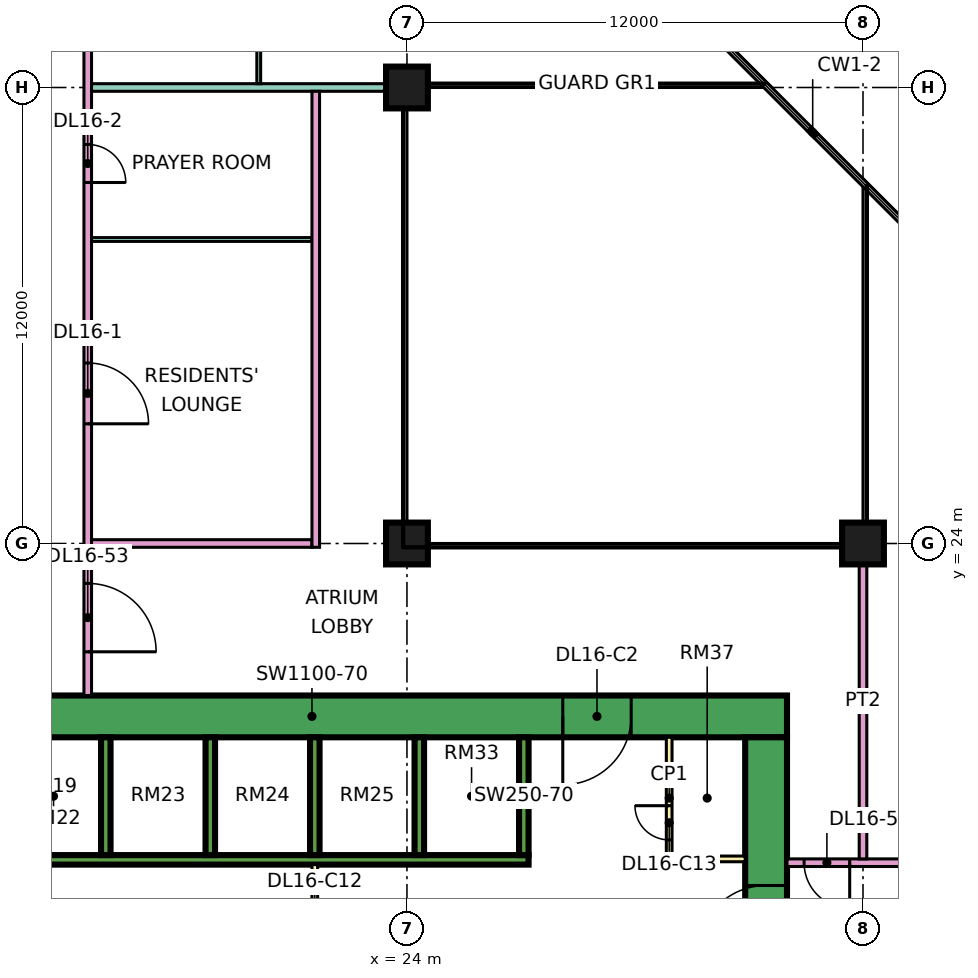
"""IFC4 building model, lengths in metres.
Left out: names, types, materials, properties, quantities, classifications, styles, units other than length and angle.
Written with IfcOpenShell. Run it as: python <this file> out.ifc"""

import sys

from ifc_helpers import new_model, si_unit, direction, frame, frame_2d, origin, origin_2d, place, context, subcontext, project, spatial, rectangle, extrude, element, fill, save


model = new_model("IFC4")
c1 = context("Model", 3, precision=1e-05, world=origin(), true_north=direction((0.0, 1.0)))
c2 = subcontext(c1, "Body", "Model", "MODEL_VIEW")
j1 = project(units=[si_unit("LENGTHUNIT", "METRE"), si_unit("PLANEANGLEUNIT", "RADIAN")], contexts=[c1])
p1 = place(None, origin())
s1 = spatial("IfcSite", under=j1, at=p1, CompositionType="ELEMENT")
p2 = place(p1, origin())
s2 = spatial("IfcBuilding", under=s1, at=p2, CompositionType="ELEMENT")
p3 = place(p2, frame((0.0, 0.0, 75.15)))
s3 = spatial("IfcBuildingStorey", under=s2, at=p3, CompositionType="ELEMENT", Elevation=75.15)
for number, where, z_axis, x_axis in (
    (1, (24.0, 24.0, 0.0), (0.0, 0.0, 1.0), (1.0, 0.0, 0.0)),
    (2, (24.0, 36.0, 0.0), (0.0, 0.0, 1.0), (1.0, 0.0, 0.0)),
    (3, (36.0, 24.0, 0.0), (0.0, 0.0, 1.0), (1.0, 0.0, 0.0)),
):
    element("IfcColumn", number, at=place(p3, frame(where, z_axis=z_axis, x_axis=x_axis)), inside=s3, PredefinedType="COLUMN", context=c2, shape_type="SweptSolid", body=[
        extrude(rectangle(XDim=1.1, YDim=1.1, at=origin_2d()), origin(), (0.0, 0.0, 1.0), 3.75),
    ])
p4 = place(p3, frame((9.0, 19.45, 0.0), z_axis=(0.0, 0.0, 1.0), x_axis=(1.0, 0.0, 0.0)))
e4 = element("IfcWall", 4, at=p4, inside=s3, PredefinedType="SHEAR", context=c2, shape_type="SweptSolid", body=[
    extrude(rectangle(XDim=25.0, YDim=1.1, at=frame_2d((12.5, 0.0))), origin(), (0.0, 0.0, 1.0), 3.75),
])
p5 = place(p4, frame((19.1, 0.0, 0.0)))
e5 = element("IfcOpeningElement", 5, at=p5, cuts=e4, PredefinedType="OPENING", context=c2, shape_type="SweptSolid", body=[
    extrude(rectangle(XDim=1.8, YDim=2.4, at=frame_2d((0.9, 1.2))), frame((0.0, 0.56, 0.0), z_axis=(0.0, -1.0, 0.0), x_axis=(1.0, 0.0, 0.0)), (0.0, 0.0, 1.0), 1.12),
])
p6 = place(p3, frame((33.45, 8.1, 0.0), z_axis=(0.0, 0.0, 1.0), x_axis=(0.0, 1.0, 0.0)))
e6 = element("IfcWall", 6, at=p6, inside=s3, PredefinedType="SHEAR", context=c2, shape_type="SweptSolid", body=[
    extrude(rectangle(XDim=10.8, YDim=1.1, at=frame_2d((5.4, 0.0))), origin(), (0.0, 0.0, 1.0), 3.75),
])
p7 = place(p6, frame((5.1, 0.0, 0.0)))
e7 = element("IfcOpeningElement", 7, at=p7, cuts=e6, PredefinedType="OPENING", context=c2, shape_type="SweptSolid", body=[
    extrude(rectangle(XDim=1.8, YDim=2.4, at=frame_2d((0.9, 1.2))), frame((0.0, 0.56, 0.0), z_axis=(0.0, -1.0, 0.0), x_axis=(1.0, 0.0, 0.0)), (0.0, 0.0, 1.0), 1.12),
])
p8 = place(p3, frame((13.45, 15.675, 0.0), z_axis=(0.0, 0.0, 1.0), x_axis=(1.0, 0.0, 0.0)))
e8 = element("IfcWall", 8, at=p8, inside=s3, PredefinedType="SHEAR", context=c2, shape_type="SweptSolid", body=[
    extrude(rectangle(XDim=13.75, YDim=0.25, at=frame_2d((6.875, 0.0))), origin(), (0.0, 0.0, 1.0), 3.75),
])
for number, where, z_axis, x_axis in (
    (9, (16.075, 15.8, 0.0), (0.0, 0.0, 1.0), (0.0, 1.0, 0.0)),
    (10, (18.825, 15.8, 0.0), (0.0, 0.0, 1.0), (0.0, 1.0, 0.0)),
    (11, (21.575, 15.8, 0.0), (0.0, 0.0, 1.0), (0.0, 1.0, 0.0)),
    (12, (24.325, 15.8, 0.0), (0.0, 0.0, 1.0), (0.0, 1.0, 0.0)),
    (13, (27.075, 15.8, 0.0), (0.0, 0.0, 1.0), (0.0, 1.0, 0.0)),
):
    element("IfcWall", number, at=place(p3, frame(where, z_axis=z_axis, x_axis=x_axis)), inside=s3, PredefinedType="SHEAR", context=c2, shape_type="SweptSolid", body=[
        extrude(rectangle(XDim=3.1, YDim=0.25, at=frame_2d((1.55, 0.0))), origin(), (0.0, 0.0, 1.0), 3.75),
    ])
p9 = place(p3, frame((21.575, 11.45, 0.0), z_axis=(0.0, 0.0, 1.0), x_axis=(0.0, 1.0, 0.0)))
e14 = element("IfcWall", 14, at=p9, inside=s3, PredefinedType="PARTITIONING", context=c2, shape_type="SweptSolid", body=[
    extrude(rectangle(XDim=4.1, YDim=0.15, at=frame_2d((2.05, 0.0))), origin(), (0.0, 0.0, 1.0), 3.35),
])
p10 = place(p9, frame((1.15, 0.0, 0.0)))
e15 = element("IfcOpeningElement", 15, at=p10, cuts=e14, PredefinedType="OPENING", context=c2, shape_type="SweptSolid", body=[
    extrude(rectangle(XDim=1.8, YDim=2.4, at=frame_2d((0.9, 1.2))), frame((0.0, 0.085, 0.0), z_axis=(0.0, -1.0, 0.0), x_axis=(1.0, 0.0, 0.0)), (0.0, 0.0, 1.0), 0.17),
])
p11 = place(p3, frame((30.9, 15.7, 0.0), z_axis=(0.0, 0.0, 1.0), x_axis=(0.0, 1.0, 0.0)))
e16 = element("IfcWall", 16, at=p11, inside=s3, PredefinedType="PARTITIONING", context=c2, shape_type="SweptSolid", body=[
    extrude(rectangle(XDim=3.2, YDim=0.15, at=frame_2d((1.6, 0.0))), origin(), (0.0, 0.0, 1.0), 3.35),
])
p12 = place(p11, frame((0.5, 0.0, 0.0)))
e17 = element("IfcOpeningElement", 17, at=p12, cuts=e16, PredefinedType="OPENING", context=c2, shape_type="SweptSolid", body=[
    extrude(rectangle(XDim=0.9, YDim=2.1, at=frame_2d((0.45, 1.05))), frame((0.0, 0.085, 0.0), z_axis=(0.0, -1.0, 0.0), x_axis=(1.0, 0.0, 0.0)), (0.0, 0.0, 1.0), 0.17),
])
p13 = place(p3, frame((30.9, 15.7, 0.0), z_axis=(0.0, 0.0, 1.0), x_axis=(1.0, 0.0, 0.0)))
e18 = element("IfcWall", 18, at=p13, inside=s3, PredefinedType="PARTITIONING", context=c2, shape_type="SweptSolid", body=[
    extrude(rectangle(XDim=2.0, YDim=0.15, at=frame_2d((1.0, 0.0))), origin(), (0.0, 0.0, 1.0), 3.35),
])
p14 = place(p3, frame((15.6, 20.0, 0.0), z_axis=(0.0, 0.0, 1.0), x_axis=(0.0, 1.0, 0.0)))
e19 = element("IfcWall", 19, at=p14, inside=s3, PredefinedType="PARTITIONING", context=c2, shape_type="SweptSolid", body=[
    extrude(rectangle(XDim=27.775, YDim=0.2, at=frame_2d((13.887, 0.0))), origin(), (0.0, 0.0, 1.0), 3.35),
])
p15 = place(p14, frame((7.15, 0.0, 0.0)))
e20 = element("IfcOpeningElement", 20, at=p15, cuts=e19, PredefinedType="OPENING", context=c2, shape_type="SweptSolid", body=[
    extrude(rectangle(XDim=1.6, YDim=2.1, at=frame_2d((0.8, 1.05))), frame((0.0, 0.11, 0.0), z_axis=(0.0, -1.0, 0.0), x_axis=(1.0, 0.0, 0.0)), (0.0, 0.0, 1.0), 0.22),
])
p16 = place(p14, frame((13.5, 0.0, 0.0)))
e21 = element("IfcOpeningElement", 21, at=p16, cuts=e19, PredefinedType="OPENING", context=c2, shape_type="SweptSolid", body=[
    extrude(rectangle(XDim=1.0, YDim=2.1, at=frame_2d((0.5, 1.05))), frame((0.0, 0.11, 0.0), z_axis=(0.0, -1.0, 0.0), x_axis=(1.0, 0.0, 0.0)), (0.0, 0.0, 1.0), 0.22),
])
p17 = place(p14, frame((17.35, 0.0, 0.0)))
e22 = element("IfcOpeningElement", 22, at=p17, cuts=e19, PredefinedType="OPENING", context=c2, shape_type="SweptSolid", body=[
    extrude(rectangle(XDim=1.0, YDim=2.1, at=frame_2d((0.5, 1.05))), frame((0.0, 0.11, 0.0), z_axis=(0.0, -1.0, 0.0), x_axis=(1.0, 0.0, 0.0)), (0.0, 0.0, 1.0), 0.22),
])
p18 = place(p14, frame((1.15, 0.0, 0.0)))
e23 = element("IfcOpeningElement", 23, at=p18, cuts=e19, PredefinedType="OPENING", context=c2, shape_type="SweptSolid", body=[
    extrude(rectangle(XDim=1.8, YDim=2.1, at=frame_2d((0.9, 1.05))), frame((0.0, 0.11, 0.0), z_axis=(0.0, -1.0, 0.0), x_axis=(1.0, 0.0, 0.0)), (0.0, 0.0, 1.0), 0.22),
])
p19 = place(p14, frame((25.9, 0.0, 0.0)))
e24 = element("IfcOpeningElement", 24, at=p19, cuts=e19, PredefinedType="OPENING", context=c2, shape_type="SweptSolid", body=[
    extrude(rectangle(XDim=1.0, YDim=2.1, at=frame_2d((0.5, 1.05))), frame((0.0, 0.11, 0.0), z_axis=(0.0, -1.0, 0.0), x_axis=(1.0, 0.0, 0.0)), (0.0, 0.0, 1.0), 0.22),
])
p20 = place(p3, frame((15.7, 24.0, 0.0), z_axis=(0.0, 0.0, 1.0), x_axis=(1.0, 0.0, 0.0)))
e25 = element("IfcWall", 25, at=p20, inside=s3, PredefinedType="PARTITIONING", context=c2, shape_type="SweptSolid", body=[
    extrude(rectangle(XDim=5.8, YDim=0.2, at=frame_2d((2.9, 0.0))), origin(), (0.0, 0.0, 1.0), 3.35),
])
p21 = place(p3, frame((15.7, 32.0, 0.0), z_axis=(0.0, 0.0, 1.0), x_axis=(1.0, 0.0, 0.0)))
e26 = element("IfcWall", 26, at=p21, inside=s3, PredefinedType="PARTITIONING", context=c2, shape_type="SweptSolid", body=[
    extrude(rectangle(XDim=5.8, YDim=0.1, at=frame_2d((2.9, 0.0))), origin(), (0.0, 0.0, 1.0), 3.35),
])
p22 = place(p3, frame((15.7, 36.0, 0.0), z_axis=(0.0, 0.0, 1.0), x_axis=(1.0, 0.0, 0.0)))
e27 = element("IfcWall", 27, at=p22, inside=s3, PredefinedType="PARTITIONING", context=c2, shape_type="SweptSolid", body=[
    extrude(rectangle(XDim=8.3, YDim=0.2, at=frame_2d((4.15, 0.0))), origin(), (0.0, 0.0, 1.0), 3.35),
])
p23 = place(p3, frame((20.1, 36.1, 0.0), z_axis=(0.0, 0.0, 1.0), x_axis=(0.0, 1.0, 0.0)))
e28 = element("IfcWall", 28, at=p23, inside=s3, PredefinedType="PARTITIONING", context=c2, shape_type="SweptSolid", body=[
    extrude(rectangle(XDim=2.85, YDim=0.1, at=frame_2d((1.425, 0.0))), origin(), (0.0, 0.0, 1.0), 3.35),
])
p24 = place(p23, frame((0.95, 0.0, 0.0)))
e29 = element("IfcOpeningElement", 29, at=p24, cuts=e28, PredefinedType="OPENING", context=c2, shape_type="SweptSolid", body=[
    extrude(rectangle(XDim=0.9, YDim=2.1, at=frame_2d((0.45, 1.05))), frame((0.0, 0.06, 0.0), z_axis=(0.0, -1.0, 0.0), x_axis=(1.0, 0.0, 0.0)), (0.0, 0.0, 1.0), 0.12),
])
p25 = place(p3, frame((21.6, 23.9, 0.0), z_axis=(0.0, 0.0, 1.0), x_axis=(0.0, 1.0, 0.0)))
e30 = element("IfcWall", 30, at=p25, inside=s3, PredefinedType="PARTITIONING", context=c2, shape_type="SweptSolid", body=[
    extrude(rectangle(XDim=12.0, YDim=0.2, at=frame_2d((6.0, 0.0))), origin(), (0.0, 0.0, 1.0), 3.35),
])
p26 = place(p3, frame((34.0, 15.6, 0.0), z_axis=(0.0, 0.0, 1.0), x_axis=(1.0, 0.0, 0.0)))
e31 = element("IfcWall", 31, at=p26, inside=s3, PredefinedType="PARTITIONING", context=c2, shape_type="SweptSolid", body=[
    extrude(rectangle(XDim=10.35, YDim=0.2, at=frame_2d((5.175, 0.0))), origin(), (0.0, 0.0, 1.0), 3.35),
])
p27 = place(p26, frame((5.6, 0.0, 0.0)))
e32 = element("IfcOpeningElement", 32, at=p27, cuts=e31, PredefinedType="OPENING", context=c2, shape_type="SweptSolid", body=[
    extrude(rectangle(XDim=1.0, YDim=2.1, at=frame_2d((0.5, 1.05))), frame((0.0, 0.11, 0.0), z_axis=(0.0, -1.0, 0.0), x_axis=(1.0, 0.0, 0.0)), (0.0, 0.0, 1.0), 0.22),
])
p28 = place(p26, frame((0.45, 0.0, 0.0)))
e33 = element("IfcOpeningElement", 33, at=p28, cuts=e31, PredefinedType="OPENING", context=c2, shape_type="SweptSolid", body=[
    extrude(rectangle(XDim=1.2, YDim=2.1, at=frame_2d((0.6, 1.05))), frame((0.0, 0.11, 0.0), z_axis=(0.0, -1.0, 0.0), x_axis=(1.0, 0.0, 0.0)), (0.0, 0.0, 1.0), 0.22),
])
p29 = place(p3, frame((36.0, 15.7, 0.0), z_axis=(0.0, 0.0, 1.0), x_axis=(0.0, 1.0, 0.0)))
e34 = element("IfcWall", 34, at=p29, inside=s3, PredefinedType="PARTITIONING", context=c2, shape_type="SweptSolid", body=[
    extrude(rectangle(XDim=8.3, YDim=0.2, at=frame_2d((4.15, 0.0))), origin(), (0.0, 0.0, 1.0), 3.35),
])
p30 = place(p7, origin())
e35 = element("IfcDoor", 35, at=p30, inside=s3, OperationType="DOUBLE_DOOR_SINGLE_SWING", PredefinedType="DOOR", context=c2, shape_type="SweptSolid", body=[
    extrude(rectangle(XDim=1.8, YDim=2.4, at=frame_2d((0.9, 1.2))), frame((0.0, 0.025, 0.0), z_axis=(0.0, -1.0, 0.0), x_axis=(1.0, 0.0, 0.0)), (0.0, 0.0, 1.0), 0.05),
])
fill(e7, e35)
p31 = place(p5, frame((1.8, 0.0, 0.0), z_axis=(0.0, 0.0, 1.0), x_axis=(-1.0, 0.0, 0.0)))
e36 = element("IfcDoor", 36, at=p31, inside=s3, OperationType="DOUBLE_DOOR_SINGLE_SWING", PredefinedType="DOOR", context=c2, shape_type="SweptSolid", body=[
    extrude(rectangle(XDim=1.8, YDim=2.4, at=frame_2d((0.9, 1.2))), frame((0.0, 0.025, 0.0), z_axis=(0.0, -1.0, 0.0), x_axis=(1.0, 0.0, 0.0)), (0.0, 0.0, 1.0), 0.05),
])
fill(e5, e36)
p32 = place(p12, frame((0.9, 0.0, 0.0), z_axis=(0.0, 0.0, 1.0), x_axis=(-1.0, 0.0, 0.0)))
e37 = element("IfcDoor", 37, at=p32, inside=s3, OperationType="SINGLE_SWING_RIGHT", PredefinedType="DOOR", context=c2, shape_type="SweptSolid", body=[
    extrude(rectangle(XDim=0.9, YDim=2.1, at=frame_2d((0.45, 1.05))), frame((0.0, 0.025, 0.0), z_axis=(0.0, -1.0, 0.0), x_axis=(1.0, 0.0, 0.0)), (0.0, 0.0, 1.0), 0.05),
])
fill(e17, e37)
p33 = place(p15, frame((1.6, 0.0, 0.0), z_axis=(0.0, 0.0, 1.0), x_axis=(-1.0, 0.0, 0.0)))
e38 = element("IfcDoor", 38, at=p33, inside=s3, OperationType="DOUBLE_DOOR_SINGLE_SWING", PredefinedType="DOOR", context=c2, shape_type="SweptSolid", body=[
    extrude(rectangle(XDim=1.6, YDim=2.1, at=frame_2d((0.8, 1.05))), frame((0.0, 0.025, 0.0), z_axis=(0.0, -1.0, 0.0), x_axis=(1.0, 0.0, 0.0)), (0.0, 0.0, 1.0), 0.05),
])
fill(e20, e38)
p34 = place(p16, frame((1.0, 0.0, 0.0), z_axis=(0.0, 0.0, 1.0), x_axis=(-1.0, 0.0, 0.0)))
e39 = element("IfcDoor", 39, at=p34, inside=s3, OperationType="SINGLE_SWING_LEFT", PredefinedType="DOOR", context=c2, shape_type="SweptSolid", body=[
    extrude(rectangle(XDim=1.0, YDim=2.1, at=frame_2d((0.5, 1.05))), frame((0.0, 0.025, 0.0), z_axis=(0.0, -1.0, 0.0), x_axis=(1.0, 0.0, 0.0)), (0.0, 0.0, 1.0), 0.05),
])
fill(e21, e39)
p35 = place(p28, origin())
e40 = element("IfcDoor", 40, at=p35, inside=s3, OperationType="SINGLE_SWING_RIGHT", PredefinedType="DOOR", context=c2, shape_type="SweptSolid", body=[
    extrude(rectangle(XDim=1.2, YDim=2.1, at=frame_2d((0.6, 1.05))), frame((0.0, 0.025, 0.0), z_axis=(0.0, -1.0, 0.0), x_axis=(1.0, 0.0, 0.0)), (0.0, 0.0, 1.0), 0.05),
])
fill(e33, e40)
p36 = place(p18, frame((1.8, 0.0, 0.0), z_axis=(0.0, 0.0, 1.0), x_axis=(-1.0, 0.0, 0.0)))
e41 = element("IfcDoor", 41, at=p36, inside=s3, OperationType="DOUBLE_DOOR_SINGLE_SWING", PredefinedType="DOOR", context=c2, shape_type="SweptSolid", body=[
    extrude(rectangle(XDim=1.8, YDim=2.1, at=frame_2d((0.9, 1.05))), frame((0.0, 0.025, 0.0), z_axis=(0.0, -1.0, 0.0), x_axis=(1.0, 0.0, 0.0)), (0.0, 0.0, 1.0), 0.05),
])
fill(e23, e41)
save(model, sys.argv[1])
